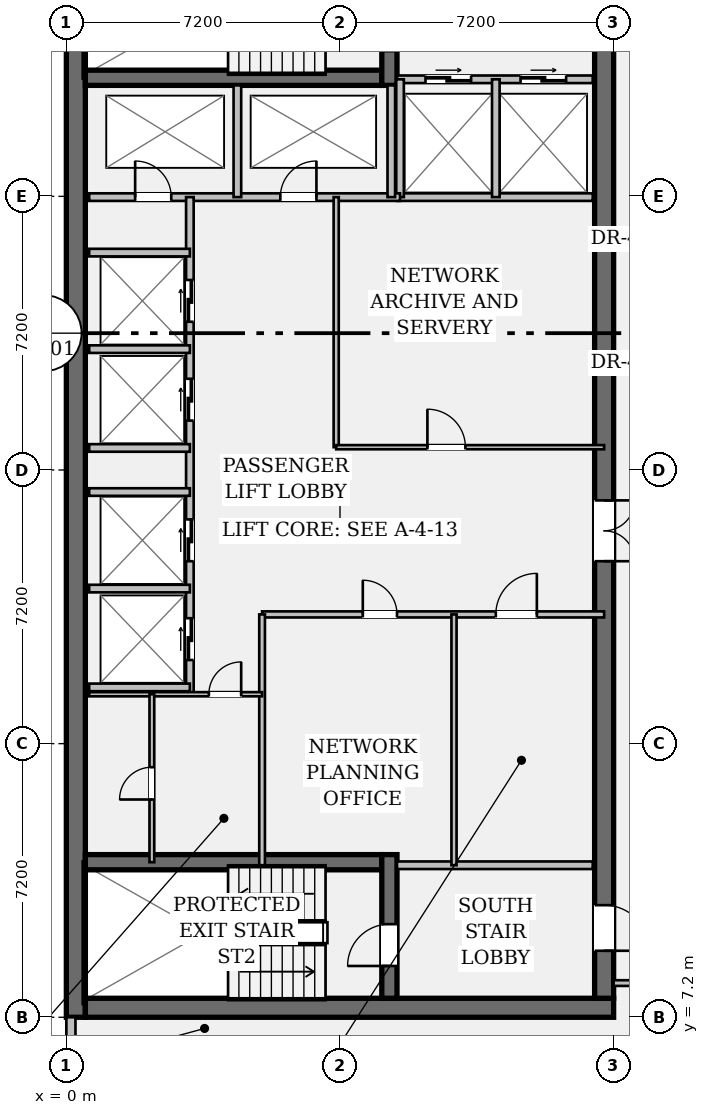
"""IFC4 building model, lengths in metres.
Left out: names, types, materials, properties, quantities, classifications, styles, units other than length and angle.
Written with IfcOpenShell. Run it as: python <this file> out.ifc"""

import sys

from ifc_helpers import new_model, si_unit, direction, frame, frame_2d, origin, place, context, subcontext, project, spatial, rectangle, extrude, element, fill, save


model = new_model("IFC4")
c1 = context("Model", 3, precision=1e-05, world=origin(), true_north=direction((0.0, 1.0)))
c2 = subcontext(c1, "Body", "Model", "MODEL_VIEW")
j1 = project(units=[si_unit("LENGTHUNIT", "METRE"), si_unit("PLANEANGLEUNIT", "RADIAN")], contexts=[c1])
p1 = place(None, origin())
s1 = spatial("IfcSite", under=j1, at=p1, CompositionType="ELEMENT")
p2 = place(p1, origin())
s2 = spatial("IfcBuilding", under=s1, at=p2, CompositionType="ELEMENT")
p3 = place(p2, frame((0.0, 0.0, 265.65)))
s3 = spatial("IfcBuildingStorey", under=s2, at=p3, CompositionType="ELEMENT", Elevation=265.65)
p4 = place(p3, frame((0.25, 7.2, 0.0), z_axis=(0.0, 0.0, 1.0), x_axis=(0.0, 1.0, 0.0)))
e1 = element("IfcWall", 1, at=p4, inside=s3, PredefinedType="SHEAR", context=c2, shape_type="SweptSolid", body=[
    extrude(rectangle(XDim=28.8, YDim=0.5, at=frame_2d((14.4, 0.0))), origin(), (0.0, 0.0, 1.0), 3.24),
])
p5 = place(p3, frame((0.5, 7.45, 0.0), z_axis=(0.0, 0.0, 1.0), x_axis=(1.0, 0.0, 0.0)))
e2 = element("IfcWall", 2, at=p5, inside=s3, PredefinedType="SHEAR", context=c2, shape_type="SweptSolid", body=[
    extrude(rectangle(XDim=13.9, YDim=0.5, at=frame_2d((6.95, 0.0))), origin(), (0.0, 0.0, 1.0), 3.24),
])
p6 = place(p3, frame((14.15, 35.5, 0.0), z_axis=(0.0, 0.0, 1.0), x_axis=(0.0, -1.0, 0.0)))
e3 = element("IfcWall", 3, at=p6, inside=s3, PredefinedType="SHEAR", context=c2, shape_type="SweptSolid", body=[
    extrude(rectangle(XDim=27.8, YDim=0.5, at=frame_2d((13.9, 0.0))), origin(), (0.0, 0.0, 1.0), 3.24),
])
p7 = place(p6, frame((1.4, 0.0, 0.0)))
e4 = element("IfcOpeningElement", 4, at=p7, cuts=e3, PredefinedType="OPENING", context=c2, shape_type="SweptSolid", body=[
    extrude(rectangle(XDim=1.2, YDim=2.15, at=frame_2d((0.6, 1.075))), frame((0.0, 0.262, 0.0), z_axis=(0.0, -1.0, 0.0), x_axis=(1.0, 0.0, 0.0)), (0.0, 0.0, 1.0), 0.524),
])
p8 = place(p6, frame((25.35, 0.0, 0.0)))
e5 = element("IfcOpeningElement", 5, at=p8, cuts=e3, PredefinedType="OPENING", context=c2, shape_type="SweptSolid", body=[
    extrude(rectangle(XDim=1.2, YDim=2.15, at=frame_2d((0.6, 1.075))), frame((0.0, 0.262, 0.0), z_axis=(0.0, -1.0, 0.0), x_axis=(1.0, 0.0, 0.0)), (0.0, 0.0, 1.0), 0.524),
])
p9 = place(p6, frame((14.7, 0.0, 0.0)))
e6 = element("IfcOpeningElement", 6, at=p9, cuts=e3, PredefinedType="OPENING", context=c2, shape_type="SweptSolid", body=[
    extrude(rectangle(XDim=1.6, YDim=2.2, at=frame_2d((0.8, 1.1))), frame((0.0, 0.262, 0.0), z_axis=(0.0, -1.0, 0.0), x_axis=(1.0, 0.0, 0.0)), (0.0, 0.0, 1.0), 0.524),
])
for number, where, z_axis, x_axis in (
    (7, (0.5, 31.92, 0.0), (0.0, 0.0, 1.0), (1.0, 0.0, 0.0)),
    (8, (0.5, 11.28, 0.0), (0.0, 0.0, 1.0), (1.0, 0.0, 0.0)),
):
    element("IfcWall", number, at=place(p3, frame(where, z_axis=z_axis, x_axis=x_axis)), inside=s3, PredefinedType="SHEAR", context=c2, shape_type="SweptSolid", body=[
        extrude(rectangle(XDim=7.8, YDim=0.4, at=frame_2d((3.9, 0.0))), origin(), (0.0, 0.0, 1.0), 3.24),
    ])
p10 = place(p3, frame((8.5, 31.72, 0.0), z_axis=(0.0, 0.0, 1.0), x_axis=(0.0, 1.0, 0.0)))
e9 = element("IfcWall", 9, at=p10, inside=s3, PredefinedType="SHEAR", context=c2, shape_type="SweptSolid", body=[
    extrude(rectangle(XDim=3.78, YDim=0.4, at=frame_2d((1.89, 0.0))), origin(), (0.0, 0.0, 1.0), 3.24),
])
p11 = place(p10, frame((0.9, 0.0, 0.0)))
e10 = element("IfcOpeningElement", 10, at=p11, cuts=e9, PredefinedType="OPENING", context=c2, shape_type="SweptSolid", body=[
    extrude(rectangle(XDim=1.1, YDim=2.15, at=frame_2d((0.55, 1.075))), frame((0.0, 0.212, 0.0), z_axis=(0.0, -1.0, 0.0), x_axis=(1.0, 0.0, 0.0)), (0.0, 0.0, 1.0), 0.424),
])
p12 = place(p3, frame((8.5, 7.7, 0.0), z_axis=(0.0, 0.0, 1.0), x_axis=(0.0, 1.0, 0.0)))
e11 = element("IfcWall", 11, at=p12, inside=s3, PredefinedType="SHEAR", context=c2, shape_type="SweptSolid", body=[
    extrude(rectangle(XDim=3.78, YDim=0.4, at=frame_2d((1.89, 0.0))), origin(), (0.0, 0.0, 1.0), 3.24),
])
p13 = place(p12, frame((0.85, 0.0, 0.0)))
e12 = element("IfcOpeningElement", 12, at=p13, cuts=e11, PredefinedType="OPENING", context=c2, shape_type="SweptSolid", body=[
    extrude(rectangle(XDim=1.1, YDim=2.15, at=frame_2d((0.55, 1.075))), frame((0.0, 0.212, 0.0), z_axis=(0.0, -1.0, 0.0), x_axis=(1.0, 0.0, 0.0)), (0.0, 0.0, 1.0), 0.424),
])
p14 = place(p3, frame((0.12, 6.52, 0.0), z_axis=(0.0, 0.0, 1.0), x_axis=(0.0, 1.0, 0.0)))
e13 = element("IfcWall", 13, at=p14, inside=s3, PredefinedType="STANDARD", context=c2, shape_type="SweptSolid", body=[
    extrude(rectangle(XDim=0.68, YDim=0.24, at=frame_2d((0.34, 0.0))), origin(), (0.0, 0.0, 1.0), 3.24),
])
p15 = place(p3, frame((8.7, 31.88, 0.0), z_axis=(0.0, 0.0, 1.0), x_axis=(1.0, 0.0, 0.0)))
e14 = element("IfcWall", 14, at=p15, inside=s3, PredefinedType="PARTITIONING", context=c2, shape_type="SweptSolid", body=[
    extrude(rectangle(XDim=5.15, YDim=0.2, at=frame_2d((2.575, 0.0))), origin(), (0.0, 0.0, 1.0), 3.24),
])
p16 = place(p15, frame((0.75, 0.0, 0.0)))
e15 = element("IfcOpeningElement", 15, at=p16, cuts=e14, PredefinedType="OPENING", context=c2, shape_type="SweptSolid", body=[
    extrude(rectangle(XDim=1.2, YDim=2.2, at=frame_2d((0.6, 1.1))), frame((0.0, 0.112, 0.0), z_axis=(0.0, -1.0, 0.0), x_axis=(1.0, 0.0, 0.0)), (0.0, 0.0, 1.0), 0.224),
])
p17 = place(p15, frame((3.25, 0.0, 0.0)))
e16 = element("IfcOpeningElement", 16, at=p17, cuts=e14, PredefinedType="OPENING", context=c2, shape_type="SweptSolid", body=[
    extrude(rectangle(XDim=1.2, YDim=2.2, at=frame_2d((0.6, 1.1))), frame((0.0, 0.112, 0.0), z_axis=(0.0, -1.0, 0.0), x_axis=(1.0, 0.0, 0.0)), (0.0, 0.0, 1.0), 0.224),
])
for number, where, z_axis, x_axis in (
    (17, (8.7, 11.2, 0.0), (0.0, 0.0, 1.0), (1.0, 0.0, 0.0)),
    (18, (8.7, 28.78, 0.0), (0.0, 0.0, 1.0), (1.0, 0.0, 0.0)),
):
    element("IfcWall", number, at=place(p3, frame(where, z_axis=z_axis, x_axis=x_axis)), inside=s3, PredefinedType="PARTITIONING", context=c2, shape_type="SweptSolid", body=[
        extrude(rectangle(XDim=5.15, YDim=0.2, at=frame_2d((2.575, 0.0))), origin(), (0.0, 0.0, 1.0), 3.24),
    ])
for number, where, z_axis, x_axis in (
    (19, (8.78, 28.78, 0.0), (0.0, 0.0, 1.0), (0.0, 1.0, 0.0)),
    (20, (11.3, 28.78, 0.0), (0.0, 0.0, 1.0), (0.0, 1.0, 0.0)),
):
    element("IfcWall", number, at=place(p3, frame(where, z_axis=z_axis, x_axis=x_axis)), inside=s3, PredefinedType="PARTITIONING", context=c2, shape_type="SweptSolid", body=[
        extrude(rectangle(XDim=3.1, YDim=0.2, at=frame_2d((1.55, 0.0))), origin(), (0.0, 0.0, 1.0), 3.24),
    ])
p18 = place(p3, frame((0.6, 28.78, 0.0), z_axis=(0.0, 0.0, 1.0), x_axis=(1.0, 0.0, 0.0)))
e21 = element("IfcWall", 21, at=p18, inside=s3, PredefinedType="PARTITIONING", context=c2, shape_type="SweptSolid", body=[
    extrude(rectangle(XDim=8.18, YDim=0.2, at=frame_2d((4.09, 0.0))), origin(), (0.0, 0.0, 1.0), 3.24),
])
p19 = place(p18, frame((1.21, 0.0, 0.0)))
e22 = element("IfcOpeningElement", 22, at=p19, cuts=e21, PredefinedType="OPENING", context=c2, shape_type="SweptSolid", body=[
    extrude(rectangle(XDim=0.95, YDim=2.15, at=frame_2d((0.475, 1.075))), frame((0.0, 0.112, 0.0), z_axis=(0.0, -1.0, 0.0), x_axis=(1.0, 0.0, 0.0)), (0.0, 0.0, 1.0), 0.224),
])
p20 = place(p18, frame((5.03, 0.0, 0.0)))
e23 = element("IfcOpeningElement", 23, at=p20, cuts=e21, PredefinedType="OPENING", context=c2, shape_type="SweptSolid", body=[
    extrude(rectangle(XDim=0.95, YDim=2.15, at=frame_2d((0.475, 1.075))), frame((0.0, 0.112, 0.0), z_axis=(0.0, -1.0, 0.0), x_axis=(1.0, 0.0, 0.0)), (0.0, 0.0, 1.0), 0.224),
])
for number, where, z_axis, x_axis in (
    (24, (4.5, 28.78, 0.0), (0.0, 0.0, 1.0), (0.0, 1.0, 0.0)),
    (25, (8.55, 28.78, 0.0), (0.0, 0.0, 1.0), (0.0, 1.0, 0.0)),
):
    element("IfcWall", number, at=place(p3, frame(where, z_axis=z_axis, x_axis=x_axis)), inside=s3, PredefinedType="PARTITIONING", context=c2, shape_type="SweptSolid", body=[
        extrude(rectangle(XDim=2.94, YDim=0.2, at=frame_2d((1.47, 0.0))), origin(), (0.0, 0.0, 1.0), 3.24),
    ])
p21 = place(p3, frame((3.25, 15.7, 0.0), z_axis=(0.0, 0.0, 1.0), x_axis=(0.0, 1.0, 0.0)))
e26 = element("IfcWall", 26, at=p21, inside=s3, PredefinedType="PARTITIONING", context=c2, shape_type="SweptSolid", body=[
    extrude(rectangle(XDim=13.08, YDim=0.2, at=frame_2d((6.54, 0.0))), origin(), (0.0, 0.0, 1.0), 3.24),
])
p22 = place(p21, frame((0.9, 0.0, 0.0)))
e27 = element("IfcOpeningElement", 27, at=p22, cuts=e26, PredefinedType="OPENING", context=c2, shape_type="SweptSolid", body=[
    extrude(rectangle(XDim=1.1, YDim=2.2, at=frame_2d((0.55, 1.1))), frame((0.0, 0.112, 0.0), z_axis=(0.0, -1.0, 0.0), x_axis=(1.0, 0.0, 0.0)), (0.0, 0.0, 1.0), 0.224),
])
p23 = place(p21, frame((3.5, 0.0, 0.0)))
e28 = element("IfcOpeningElement", 28, at=p23, cuts=e26, PredefinedType="OPENING", context=c2, shape_type="SweptSolid", body=[
    extrude(rectangle(XDim=1.1, YDim=2.2, at=frame_2d((0.55, 1.1))), frame((0.0, 0.112, 0.0), z_axis=(0.0, -1.0, 0.0), x_axis=(1.0, 0.0, 0.0)), (0.0, 0.0, 1.0), 0.224),
])
p24 = place(p21, frame((7.2, 0.0, 0.0)))
e29 = element("IfcOpeningElement", 29, at=p24, cuts=e26, PredefinedType="OPENING", context=c2, shape_type="SweptSolid", body=[
    extrude(rectangle(XDim=1.1, YDim=2.2, at=frame_2d((0.55, 1.1))), frame((0.0, 0.112, 0.0), z_axis=(0.0, -1.0, 0.0), x_axis=(1.0, 0.0, 0.0)), (0.0, 0.0, 1.0), 0.224),
])
p25 = place(p21, frame((9.8, 0.0, 0.0)))
e30 = element("IfcOpeningElement", 30, at=p25, cuts=e26, PredefinedType="OPENING", context=c2, shape_type="SweptSolid", body=[
    extrude(rectangle(XDim=1.1, YDim=2.2, at=frame_2d((0.55, 1.1))), frame((0.0, 0.112, 0.0), z_axis=(0.0, -1.0, 0.0), x_axis=(1.0, 0.0, 0.0)), (0.0, 0.0, 1.0), 0.224),
])
for number, where, z_axis, x_axis in (
    (31, (0.6, 15.88, 0.0), (0.0, 0.0, 1.0), (1.0, 0.0, 0.0)),
    (32, (0.6, 18.48, 0.0), (0.0, 0.0, 1.0), (1.0, 0.0, 0.0)),
    (33, (0.6, 22.18, 0.0), (0.0, 0.0, 1.0), (1.0, 0.0, 0.0)),
    (34, (0.6, 24.78, 0.0), (0.0, 0.0, 1.0), (1.0, 0.0, 0.0)),
    (35, (0.6, 21.02, 0.0), (0.0, 0.0, 1.0), (1.0, 0.0, 0.0)),
    (36, (0.6, 27.32, 0.0), (0.0, 0.0, 1.0), (1.0, 0.0, 0.0)),
):
    element("IfcWall", number, at=place(p3, frame(where, z_axis=z_axis, x_axis=x_axis)), inside=s3, PredefinedType="PARTITIONING", context=c2, shape_type="SweptSolid", body=[
        extrude(rectangle(XDim=2.65, YDim=0.2, at=frame_2d((1.325, 0.0))), origin(), (0.0, 0.0, 1.0), 3.24),
    ])
p26 = place(p3, frame((7.1, 22.2, 0.0), z_axis=(0.0, 0.0, 1.0), x_axis=(0.0, 1.0, 0.0)))
e37 = element("IfcWall", 37, at=p26, inside=s3, PredefinedType="PARTITIONING", context=c2, shape_type="SweptSolid", body=[
    extrude(rectangle(XDim=6.58, YDim=0.135, at=frame_2d((3.29, 0.0))), origin(), (0.0, 0.0, 1.0), 3.24),
])
p27 = place(p3, frame((7.1, 22.2, 0.0), z_axis=(0.0, 0.0, 1.0), x_axis=(1.0, 0.0, 0.0)))
e38 = element("IfcWall", 38, at=p27, inside=s3, PredefinedType="PARTITIONING", context=c2, shape_type="SweptSolid", body=[
    extrude(rectangle(XDim=7.05, YDim=0.11, at=frame_2d((3.525, 0.0))), origin(), (0.0, 0.0, 1.0), 3.24),
])
p28 = place(p27, frame((2.4, 0.0, 0.0)))
e39 = element("IfcOpeningElement", 39, at=p28, cuts=e38, PredefinedType="OPENING", context=c2, shape_type="SweptSolid", body=[
    extrude(rectangle(XDim=1.0, YDim=2.15, at=frame_2d((0.5, 1.075))), frame((0.0, 0.067, 0.0), z_axis=(0.0, -1.0, 0.0), x_axis=(1.0, 0.0, 0.0)), (0.0, 0.0, 1.0), 0.134),
])
p29 = place(p3, frame((5.15, 17.8, 0.0), z_axis=(0.0, 0.0, 1.0), x_axis=(1.0, 0.0, 0.0)))
e40 = element("IfcWall", 40, at=p29, inside=s3, PredefinedType="PARTITIONING", context=c2, shape_type="SweptSolid", body=[
    extrude(rectangle(XDim=9.0, YDim=0.16, at=frame_2d((4.5, 0.0))), origin(), (0.0, 0.0, 1.0), 3.24),
])
p30 = place(p29, frame((2.65, 0.0, 0.0)))
e41 = element("IfcOpeningElement", 41, at=p30, cuts=e40, PredefinedType="OPENING", context=c2, shape_type="SweptSolid", body=[
    extrude(rectangle(XDim=0.9, YDim=2.15, at=frame_2d((0.45, 1.075))), frame((0.0, 0.092, 0.0), z_axis=(0.0, -1.0, 0.0), x_axis=(1.0, 0.0, 0.0)), (0.0, 0.0, 1.0), 0.184),
])
p31 = place(p29, frame((6.15, 0.0, 0.0)))
e42 = element("IfcOpeningElement", 42, at=p31, cuts=e40, PredefinedType="OPENING", context=c2, shape_type="SweptSolid", body=[
    extrude(rectangle(XDim=1.08, YDim=2.15, at=frame_2d((0.54, 1.075))), frame((0.0, 0.092, 0.0), z_axis=(0.0, -1.0, 0.0), x_axis=(1.0, 0.0, 0.0)), (0.0, 0.0, 1.0), 0.184),
])
p32 = place(p3, frame((5.15, 11.2, 0.0), z_axis=(0.0, 0.0, 1.0), x_axis=(0.0, 1.0, 0.0)))
e43 = element("IfcWall", 43, at=p32, inside=s3, PredefinedType="PARTITIONING", context=c2, shape_type="SweptSolid", body=[
    extrude(rectangle(XDim=6.6, YDim=0.15, at=frame_2d((3.3, 0.0))), origin(), (0.0, 0.0, 1.0), 3.24),
])
p33 = place(p3, frame((10.2, 11.2, 0.0), z_axis=(0.0, 0.0, 1.0), x_axis=(0.0, 1.0, 0.0)))
e44 = element("IfcWall", 44, at=p33, inside=s3, PredefinedType="PARTITIONING", context=c2, shape_type="SweptSolid", body=[
    extrude(rectangle(XDim=6.6, YDim=0.135, at=frame_2d((3.3, 0.0))), origin(), (0.0, 0.0, 1.0), 3.24),
])
p34 = place(p3, frame((0.6, 15.7, 0.0), z_axis=(0.0, 0.0, 1.0), x_axis=(1.0, 0.0, 0.0)))
e45 = element("IfcWall", 45, at=p34, inside=s3, PredefinedType="PARTITIONING", context=c2, shape_type="SweptSolid", body=[
    extrude(rectangle(XDim=4.55, YDim=0.11, at=frame_2d((2.275, 0.0))), origin(), (0.0, 0.0, 1.0), 3.24),
])
p35 = place(p34, frame((3.15, 0.0, 0.0)))
e46 = element("IfcOpeningElement", 46, at=p35, cuts=e45, PredefinedType="OPENING", context=c2, shape_type="SweptSolid", body=[
    extrude(rectangle(XDim=0.85, YDim=2.15, at=frame_2d((0.425, 1.075))), frame((0.0, 0.067, 0.0), z_axis=(0.0, -1.0, 0.0), x_axis=(1.0, 0.0, 0.0)), (0.0, 0.0, 1.0), 0.134),
])
p36 = place(p3, frame((2.25, 11.28, 0.0), z_axis=(0.0, 0.0, 1.0), x_axis=(0.0, 1.0, 0.0)))
e47 = element("IfcWall", 47, at=p36, inside=s3, PredefinedType="PARTITIONING", context=c2, shape_type="SweptSolid", body=[
    extrude(rectangle(XDim=4.42, YDim=0.125, at=frame_2d((2.21, 0.0))), origin(), (0.0, 0.0, 1.0), 3.24),
])
p37 = place(p36, frame((1.65, 0.0, 0.0)))
e48 = element("IfcOpeningElement", 48, at=p37, cuts=e47, PredefinedType="OPENING", context=c2, shape_type="SweptSolid", body=[
    extrude(rectangle(XDim=0.85, YDim=2.15, at=frame_2d((0.425, 1.075))), frame((0.0, 0.074, 0.0), z_axis=(0.0, -1.0, 0.0), x_axis=(1.0, 0.0, 0.0)), (0.0, 0.0, 1.0), 0.149),
])
p38 = place(p3, frame((14.4, 8.1, 0.0), z_axis=(0.0, 0.0, 1.0), x_axis=(1.0, 0.0, 0.0)))
e49 = element("IfcWall", 49, at=p38, inside=s3, PredefinedType="PARTITIONING", context=c2, shape_type="SweptSolid", body=[
    extrude(rectangle(XDim=2.95, YDim=0.15, at=frame_2d((1.475, 0.0))), origin(), (0.0, 0.0, 1.0), 3.24),
])
p39 = place(p38, frame((0.95, 0.0, 0.0)))
e50 = element("IfcOpeningElement", 50, at=p39, cuts=e49, PredefinedType="OPENING", context=c2, shape_type="SweptSolid", body=[
    extrude(rectangle(XDim=1.08, YDim=2.15, at=frame_2d((0.54, 1.075))), frame((0.0, 0.087, 0.0), z_axis=(0.0, -1.0, 0.0), x_axis=(1.0, 0.0, 0.0)), (0.0, 0.0, 1.0), 0.174),
])
p40 = place(p13, origin())
e51 = element("IfcDoor", 51, at=p40, inside=s3, OperationType="SINGLE_SWING_LEFT", PredefinedType="DOOR", context=c2, shape_type="SweptSolid", body=[
    extrude(rectangle(XDim=1.1, YDim=2.15, at=frame_2d((0.55, 1.075))), frame((0.0, 0.025, 0.0), z_axis=(0.0, -1.0, 0.0), x_axis=(1.0, 0.0, 0.0)), (0.0, 0.0, 1.0), 0.05),
])
fill(e12, e51)
p41 = place(p8, origin())
e52 = element("IfcDoor", 52, at=p41, inside=s3, OperationType="SINGLE_SWING_RIGHT", PredefinedType="DOOR", context=c2, shape_type="SweptSolid", body=[
    extrude(rectangle(XDim=1.2, YDim=2.15, at=frame_2d((0.6, 1.075))), frame((0.0, 0.025, 0.0), z_axis=(0.0, -1.0, 0.0), x_axis=(1.0, 0.0, 0.0)), (0.0, 0.0, 1.0), 0.05),
])
fill(e5, e52)
p42 = place(p16, origin())
e53 = element("IfcDoor", 53, at=p42, inside=s3, OperationType="DOUBLE_DOOR_SLIDING", PredefinedType="DOOR", context=c2, shape_type="SweptSolid", body=[
    extrude(rectangle(XDim=1.2, YDim=2.2, at=frame_2d((0.6, 1.1))), frame((0.0, 0.025, 0.0), z_axis=(0.0, -1.0, 0.0), x_axis=(1.0, 0.0, 0.0)), (0.0, 0.0, 1.0), 0.05),
])
fill(e15, e53)
p43 = place(p17, origin())
e54 = element("IfcDoor", 54, at=p43, inside=s3, OperationType="DOUBLE_DOOR_SLIDING", PredefinedType="DOOR", context=c2, shape_type="SweptSolid", body=[
    extrude(rectangle(XDim=1.2, YDim=2.2, at=frame_2d((0.6, 1.1))), frame((0.0, 0.025, 0.0), z_axis=(0.0, -1.0, 0.0), x_axis=(1.0, 0.0, 0.0)), (0.0, 0.0, 1.0), 0.05),
])
fill(e16, e54)
p44 = place(p19, origin())
e55 = element("IfcDoor", 55, at=p44, inside=s3, OperationType="SINGLE_SWING_LEFT", PredefinedType="DOOR", context=c2, shape_type="SweptSolid", body=[
    extrude(rectangle(XDim=0.95, YDim=2.15, at=frame_2d((0.475, 1.075))), frame((0.0, 0.025, 0.0), z_axis=(0.0, -1.0, 0.0), x_axis=(1.0, 0.0, 0.0)), (0.0, 0.0, 1.0), 0.05),
])
fill(e22, e55)
p45 = place(p20, origin())
e56 = element("IfcDoor", 56, at=p45, inside=s3, OperationType="SINGLE_SWING_RIGHT", PredefinedType="DOOR", context=c2, shape_type="SweptSolid", body=[
    extrude(rectangle(XDim=0.95, YDim=2.15, at=frame_2d((0.475, 1.075))), frame((0.0, 0.025, 0.0), z_axis=(0.0, -1.0, 0.0), x_axis=(1.0, 0.0, 0.0)), (0.0, 0.0, 1.0), 0.05),
])
fill(e23, e56)
p46 = place(p9, origin())
e57 = element("IfcDoor", 57, at=p46, inside=s3, OperationType="DOUBLE_DOOR_SINGLE_SWING", PredefinedType="DOOR", context=c2, shape_type="SweptSolid", body=[
    extrude(rectangle(XDim=1.6, YDim=2.2, at=frame_2d((0.8, 1.1))), frame((0.0, 0.025, 0.0), z_axis=(0.0, -1.0, 0.0), x_axis=(1.0, 0.0, 0.0)), (0.0, 0.0, 1.0), 0.05),
])
fill(e6, e57)
p47 = place(p22, origin())
e58 = element("IfcDoor", 58, at=p47, inside=s3, OperationType="DOUBLE_DOOR_SLIDING", PredefinedType="DOOR", context=c2, shape_type="SweptSolid", body=[
    extrude(rectangle(XDim=1.1, YDim=2.2, at=frame_2d((0.55, 1.1))), frame((0.0, 0.025, 0.0), z_axis=(0.0, -1.0, 0.0), x_axis=(1.0, 0.0, 0.0)), (0.0, 0.0, 1.0), 0.05),
])
fill(e27, e58)
p48 = place(p23, origin())
e59 = element("IfcDoor", 59, at=p48, inside=s3, OperationType="DOUBLE_DOOR_SLIDING", PredefinedType="DOOR", context=c2, shape_type="SweptSolid", body=[
    extrude(rectangle(XDim=1.1, YDim=2.2, at=frame_2d((0.55, 1.1))), frame((0.0, 0.025, 0.0), z_axis=(0.0, -1.0, 0.0), x_axis=(1.0, 0.0, 0.0)), (0.0, 0.0, 1.0), 0.05),
])
fill(e28, e59)
p49 = place(p24, origin())
e60 = element("IfcDoor", 60, at=p49, inside=s3, OperationType="DOUBLE_DOOR_SLIDING", PredefinedType="DOOR", context=c2, shape_type="SweptSolid", body=[
    extrude(rectangle(XDim=1.1, YDim=2.2, at=frame_2d((0.55, 1.1))), frame((0.0, 0.025, 0.0), z_axis=(0.0, -1.0, 0.0), x_axis=(1.0, 0.0, 0.0)), (0.0, 0.0, 1.0), 0.05),
])
fill(e29, e60)
p50 = place(p25, origin())
e61 = element("IfcDoor", 61, at=p50, inside=s3, OperationType="DOUBLE_DOOR_SLIDING", PredefinedType="DOOR", context=c2, shape_type="SweptSolid", body=[
    extrude(rectangle(XDim=1.1, YDim=2.2, at=frame_2d((0.55, 1.1))), frame((0.0, 0.025, 0.0), z_axis=(0.0, -1.0, 0.0), x_axis=(1.0, 0.0, 0.0)), (0.0, 0.0, 1.0), 0.05),
])
fill(e30, e61)
p51 = place(p28, origin())
e62 = element("IfcDoor", 62, at=p51, inside=s3, OperationType="SINGLE_SWING_LEFT", PredefinedType="DOOR", context=c2, shape_type="SweptSolid", body=[
    extrude(rectangle(XDim=1.0, YDim=2.15, at=frame_2d((0.5, 1.075))), frame((0.0, 0.025, 0.0), z_axis=(0.0, -1.0, 0.0), x_axis=(1.0, 0.0, 0.0)), (0.0, 0.0, 1.0), 0.05),
])
fill(e39, e62)
p52 = place(p30, origin())
e63 = element("IfcDoor", 63, at=p52, inside=s3, OperationType="SINGLE_SWING_LEFT", PredefinedType="DOOR", context=c2, shape_type="SweptSolid", body=[
    extrude(rectangle(XDim=0.9, YDim=2.15, at=frame_2d((0.45, 1.075))), frame((0.0, 0.025, 0.0), z_axis=(0.0, -1.0, 0.0), x_axis=(1.0, 0.0, 0.0)), (0.0, 0.0, 1.0), 0.05),
])
fill(e41, e63)
p53 = place(p31, origin())
e64 = element("IfcDoor", 64, at=p53, inside=s3, OperationType="SINGLE_SWING_RIGHT", PredefinedType="DOOR", context=c2, shape_type="SweptSolid", body=[
    extrude(rectangle(XDim=1.08, YDim=2.15, at=frame_2d((0.54, 1.075))), frame((0.0, 0.025, 0.0), z_axis=(0.0, -1.0, 0.0), x_axis=(1.0, 0.0, 0.0)), (0.0, 0.0, 1.0), 0.05),
])
fill(e42, e64)
p54 = place(p35, origin())
e65 = element("IfcDoor", 65, at=p54, inside=s3, OperationType="SINGLE_SWING_RIGHT", PredefinedType="DOOR", context=c2, shape_type="SweptSolid", body=[
    extrude(rectangle(XDim=0.85, YDim=2.15, at=frame_2d((0.425, 1.075))), frame((0.0, 0.025, 0.0), z_axis=(0.0, -1.0, 0.0), x_axis=(1.0, 0.0, 0.0)), (0.0, 0.0, 1.0), 0.05),
])
fill(e46, e65)
p55 = place(p37, origin())
e66 = element("IfcDoor", 66, at=p55, inside=s3, OperationType="SINGLE_SWING_LEFT", PredefinedType="DOOR", context=c2, shape_type="SweptSolid", body=[
    extrude(rectangle(XDim=0.85, YDim=2.15, at=frame_2d((0.425, 1.075))), frame((0.0, 0.025, 0.0), z_axis=(0.0, -1.0, 0.0), x_axis=(1.0, 0.0, 0.0)), (0.0, 0.0, 1.0), 0.05),
])
fill(e48, e66)
save(model, sys.argv[1])
